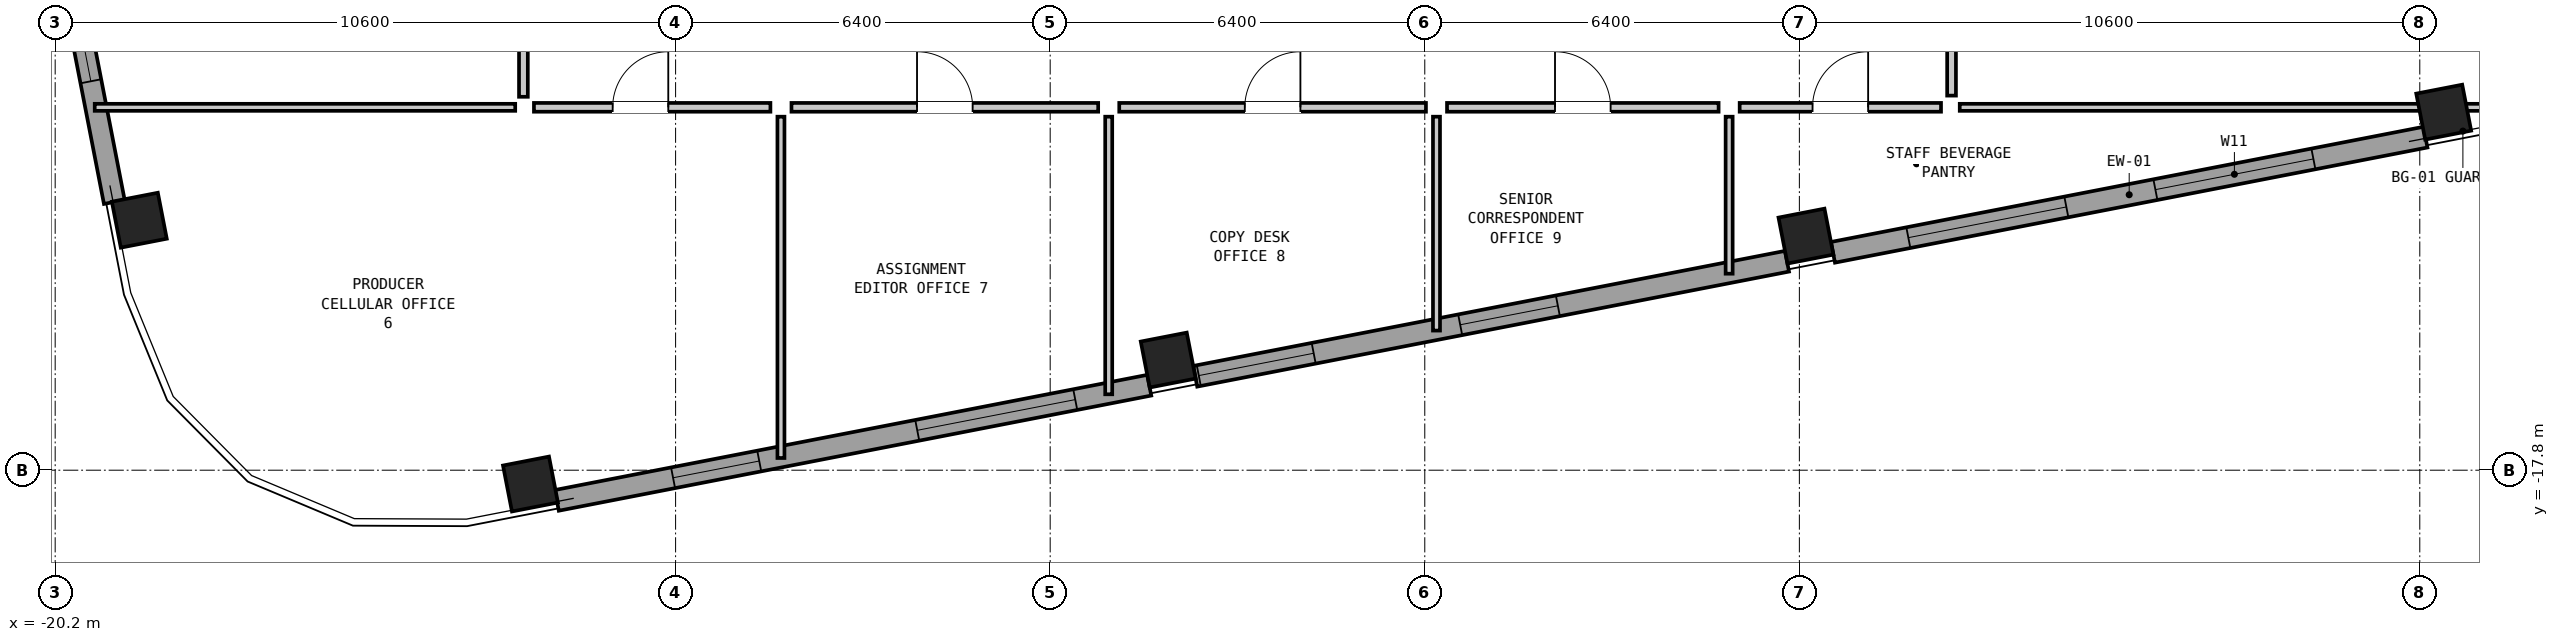
"""IFC4 building model, lengths in metres.
Left out: names, types, materials, properties, quantities, classifications, styles, units other than length and angle.
Written with IfcOpenShell. Run it as: python <this file> out.ifc"""

import sys

from ifc_helpers import new_model, si_unit, direction, frame, frame_2d, origin, origin_2d, place, context, subcontext, project, spatial, rectangle, hollow_rectangle, extrude, element, fill, save


model = new_model("IFC4")
c1 = context("Model", 3, precision=1e-05, world=origin(), true_north=direction((0.0, 1.0)))
c2 = subcontext(c1, "Body", "Model", "MODEL_VIEW")
j1 = project(units=[si_unit("LENGTHUNIT", "METRE"), si_unit("PLANEANGLEUNIT", "RADIAN")], contexts=[c1])
p1 = place(None, origin())
s1 = spatial("IfcSite", under=j1, at=p1, CompositionType="ELEMENT")
p2 = place(p1, origin())
s2 = spatial("IfcBuilding", under=s1, at=p2, CompositionType="ELEMENT")
p3 = place(p2, frame((0.0, 0.0, 121.95)))
s3 = spatial("IfcBuildingStorey", under=s2, at=p3, CompositionType="ELEMENT", Elevation=121.95)
for number, where, z_axis, x_axis in (
    (1, (-12.08, -18.036, 0.0), (0.0, 0.0, 1.0), (0.982, 0.191, 0.0)),
    (2, (-1.183, -15.918, 0.0), (0.0, 0.0, 1.0), (0.982, 0.191, 0.0)),
    (3, (9.713, -13.8, 0.0), (0.0, 0.0, 1.0), (0.982, 0.191, 0.0)),
    (4, (20.609, -11.682, 0.0), (0.0, 0.0, 1.0), (0.982, 0.191, 0.0)),
    (5, (-18.762, -13.529, 0.0), (0.0, 0.0, 1.0), (-0.191, 0.982, 0.0)),
):
    element("IfcColumn", number, at=place(p3, frame(where, z_axis=z_axis, x_axis=x_axis)), inside=s3, PredefinedType="COLUMN", context=c2, shape_type="SweptSolid", body=[
        extrude(hollow_rectangle(XDim=0.8, YDim=0.8, WallThickness=0.05, at=origin_2d()), origin(), (0.0, 0.0, 1.0), 3.05),
    ])
p4 = place(p3, frame((20.296, -12.11, 0.0), z_axis=(0.0, 0.0, 1.0), x_axis=(-0.981628941133, -0.190799952646, 0.0)))
e6 = element("IfcWall", 6, at=p4, inside=s3, PredefinedType="SOLIDWALL", context=c2, shape_type="SweptSolid", body=[
    extrude(rectangle(XDim=10.312, YDim=0.36, at=frame_2d((5.156, 0.0))), origin(), (0.0, 0.0, 1.0), 2.067),
])
p5 = place(p4, frame((1.95, 0.0, 0.2)))
e7 = element("IfcOpeningElement", 7, at=p5, cuts=e6, PredefinedType="OPENING", context=c2, shape_type="SweptSolid", body=[
    extrude(rectangle(XDim=2.75, YDim=0.95, at=frame_2d((1.375, 0.475))), frame((0.0, 0.192, 0.0), z_axis=(0.0, -1.0, 0.0), x_axis=(1.0, 0.0, 0.0)), (0.0, 0.0, 1.0), 0.384),
])
p6 = place(p4, frame((6.25, 0.0, 0.95)))
e8 = element("IfcOpeningElement", 8, at=p6, cuts=e6, PredefinedType="OPENING", context=c2, shape_type="SweptSolid", body=[
    extrude(rectangle(XDim=2.75, YDim=0.95, at=frame_2d((1.375, 0.475))), frame((0.0, 0.192, 0.0), z_axis=(0.0, -1.0, 0.0), x_axis=(1.0, 0.0, 0.0)), (0.0, 0.0, 1.0), 0.384),
])
p7 = place(p3, frame((9.389, -14.23, 0.0), z_axis=(0.0, 0.0, 1.0), x_axis=(-0.981627477005, -0.190807485147, 0.0)))
e9 = element("IfcWall", 9, at=p7, inside=s3, PredefinedType="SOLIDWALL", context=c2, shape_type="SweptSolid", body=[
    extrude(rectangle(XDim=10.3, YDim=0.36, at=frame_2d((5.15, 0.0))), origin(), (0.0, 0.0, 1.0), 2.067),
])
p8 = place(p7, frame((3.988, 0.0, 0.8)))
e10 = element("IfcOpeningElement", 10, at=p8, cuts=e9, PredefinedType="OPENING", context=c2, shape_type="SweptSolid", body=[
    extrude(rectangle(XDim=1.7, YDim=1.1, at=frame_2d((0.85, 0.55))), frame((0.0, 0.192, 0.0), z_axis=(0.0, -1.0, 0.0), x_axis=(1.0, 0.0, 0.0)), (0.0, 0.0, 1.0), 0.384),
])
p9 = place(p7, frame((8.238, 0.0, 0.2)))
e11 = element("IfcOpeningElement", 11, at=p9, cuts=e9, PredefinedType="OPENING", context=c2, shape_type="SweptSolid", body=[
    extrude(rectangle(XDim=2.0, YDim=1.05, at=frame_2d((1.0, 0.525))), frame((0.0, 0.192, 0.0), z_axis=(0.0, -1.0, 0.0), x_axis=(1.0, 0.0, 0.0)), (0.0, 0.0, 1.0), 0.384),
])
p10 = place(p3, frame((-1.507, -16.348, 0.0), z_axis=(0.0, 0.0, 1.0), x_axis=(-0.981628941133, -0.190799952646, 0.0)))
e12 = element("IfcWall", 12, at=p10, inside=s3, PredefinedType="SOLIDWALL", context=c2, shape_type="SweptSolid", body=[
    extrude(rectangle(XDim=10.312, YDim=0.36, at=frame_2d((5.156, 0.0))), origin(), (0.0, 0.0, 1.0), 2.067),
])
p11 = place(p10, frame((1.288, 0.0, 0.95)))
e13 = element("IfcOpeningElement", 13, at=p11, cuts=e12, PredefinedType="OPENING", context=c2, shape_type="SweptSolid", body=[
    extrude(rectangle(XDim=2.75, YDim=0.95, at=frame_2d((1.375, 0.475))), frame((0.0, 0.192, 0.0), z_axis=(0.0, -1.0, 0.0), x_axis=(1.0, 0.0, 0.0)), (0.0, 0.0, 1.0), 0.384),
])
p12 = place(p10, frame((6.788, 0.0, 0.2)))
e14 = element("IfcOpeningElement", 14, at=p12, cuts=e12, PredefinedType="OPENING", context=c2, shape_type="SweptSolid", body=[
    extrude(rectangle(XDim=1.5, YDim=1.0, at=frame_2d((0.75, 0.5))), frame((0.0, 0.192, 0.0), z_axis=(0.0, -1.0, 0.0), x_axis=(1.0, 0.0, 0.0)), (0.0, 0.0, 1.0), 0.384),
])
p13 = place(p3, frame((-19.19, -13.217, 0.0), z_axis=(0.0, 0.0, 1.0), x_axis=(-0.190822765986, 0.981624506612, 0.0)))
e15 = element("IfcWall", 15, at=p13, inside=s3, PredefinedType="SOLIDWALL", context=c2, shape_type="SweptSolid", body=[
    extrude(rectangle(XDim=10.312, YDim=0.36, at=frame_2d((5.156, 0.0))), origin(), (0.0, 0.0, 1.0), 2.067),
])
p14 = place(p13, frame((2.1, 0.0, 0.2)))
e16 = element("IfcOpeningElement", 16, at=p14, cuts=e15, PredefinedType="OPENING", context=c2, shape_type="SweptSolid", body=[
    extrude(rectangle(XDim=2.45, YDim=1.1, at=frame_2d((1.225, 0.55))), frame((0.0, 0.192, 0.0), z_axis=(0.0, -1.0, 0.0), x_axis=(1.0, 0.0, 0.0)), (0.0, 0.0, 1.0), 0.384),
])
p15 = place(p13, frame((6.15, 0.0, 0.95)))
e17 = element("IfcOpeningElement", 17, at=p15, cuts=e15, PredefinedType="OPENING", context=c2, shape_type="SweptSolid", body=[
    extrude(rectangle(XDim=2.95, YDim=0.95, at=frame_2d((1.475, 0.475))), frame((0.0, 0.192, 0.0), z_axis=(0.0, -1.0, 0.0), x_axis=(1.0, 0.0, 0.0)), (0.0, 0.0, 1.0), 0.384),
])
p16 = place(p3, frame((-19.524, -11.6, 0.0), z_axis=(0.0, 0.0, 1.0), x_axis=(1.0, 0.0, 0.0)))
e18 = element("IfcWall", 18, at=p16, inside=s3, PredefinedType="PARTITIONING", context=c2, shape_type="SweptSolid", body=[
    extrude(rectangle(XDim=7.184, YDim=0.12, at=frame_2d((3.592, 0.0))), origin(), (0.0, 0.0, 1.0), 2.347),
])
p17 = place(p3, frame((12.34, -11.6, 0.0), z_axis=(0.0, 0.0, 1.0), x_axis=(1.0, 0.0, 0.0)))
e19 = element("IfcWall", 19, at=p17, inside=s3, PredefinedType="PARTITIONING", context=c2, shape_type="SweptSolid", body=[
    extrude(rectangle(XDim=10.066, YDim=0.12, at=frame_2d((5.033, 0.0))), origin(), (0.0, 0.0, 1.0), 2.127),
])
p18 = place(p3, frame((-7.8, -17.592, 0.0), z_axis=(0.0, 0.0, 1.0), x_axis=(0.0, 1.0, 0.0)))
e20 = element("IfcWall", 20, at=p18, inside=s3, PredefinedType="PARTITIONING", context=c2, shape_type="SweptSolid", body=[
    extrude(rectangle(XDim=5.832, YDim=0.12, at=frame_2d((2.916, 0.0))), origin(), (0.0, 0.0, 1.0), 2.83),
])
p19 = place(p3, frame((-2.2, -16.503, 0.0), z_axis=(0.0, 0.0, 1.0), x_axis=(0.0, 1.0, 0.0)))
e21 = element("IfcWall", 21, at=p19, inside=s3, PredefinedType="PARTITIONING", context=c2, shape_type="SweptSolid", body=[
    extrude(rectangle(XDim=4.743, YDim=0.12, at=frame_2d((2.372, 0.0))), origin(), (0.0, 0.0, 1.0), 2.83),
])
p20 = place(p3, frame((3.4, -15.415, 0.0), z_axis=(0.0, 0.0, 1.0), x_axis=(0.0, 1.0, 0.0)))
e22 = element("IfcWall", 22, at=p20, inside=s3, PredefinedType="PARTITIONING", context=c2, shape_type="SweptSolid", body=[
    extrude(rectangle(XDim=3.655, YDim=0.12, at=frame_2d((1.827, 0.0))), origin(), (0.0, 0.0, 1.0), 2.347),
])
p21 = place(p3, frame((8.4, -14.443, 0.0), z_axis=(0.0, 0.0, 1.0), x_axis=(0.0, 1.0, 0.0)))
e23 = element("IfcWall", 23, at=p21, inside=s3, PredefinedType="PARTITIONING", context=c2, shape_type="SweptSolid", body=[
    extrude(rectangle(XDim=2.683, YDim=0.12, at=frame_2d((1.341, 0.0))), origin(), (0.0, 0.0, 1.0), 2.83),
])
p22 = place(p3, frame((-12.02, -11.6, 0.0), z_axis=(0.0, 0.0, 1.0), x_axis=(1.0, 0.0, 0.0)))
e24 = element("IfcWall", 24, at=p22, inside=s3, PredefinedType="PARTITIONING", context=c2, shape_type="SweptSolid", body=[
    extrude(rectangle(XDim=4.04, YDim=0.15, at=frame_2d((2.02, 0.0))), origin(), (0.0, 0.0, 1.0), 2.347),
])
p23 = place(p22, frame((1.345, 0.0, 0.0)))
e25 = element("IfcOpeningElement", 25, at=p23, cuts=e24, PredefinedType="OPENING", context=c2, shape_type="SweptSolid", body=[
    extrude(rectangle(XDim=0.95, YDim=2.1, at=frame_2d((0.475, 1.05))), frame((0.0, 0.087, 0.0), z_axis=(0.0, -1.0, 0.0), x_axis=(1.0, 0.0, 0.0)), (0.0, 0.0, 1.0), 0.174),
])
p24 = place(p3, frame((-7.62, -11.6, 0.0), z_axis=(0.0, 0.0, 1.0), x_axis=(1.0, 0.0, 0.0)))
e26 = element("IfcWall", 26, at=p24, inside=s3, PredefinedType="PARTITIONING", context=c2, shape_type="SweptSolid", body=[
    extrude(rectangle(XDim=5.24, YDim=0.15, at=frame_2d((2.62, 0.0))), origin(), (0.0, 0.0, 1.0), 2.83),
])
p25 = place(p24, frame((2.145, 0.0, 0.0)))
e27 = element("IfcOpeningElement", 27, at=p25, cuts=e26, PredefinedType="OPENING", context=c2, shape_type="SweptSolid", body=[
    extrude(rectangle(XDim=0.95, YDim=2.1, at=frame_2d((0.475, 1.05))), frame((0.0, 0.087, 0.0), z_axis=(0.0, -1.0, 0.0), x_axis=(1.0, 0.0, 0.0)), (0.0, 0.0, 1.0), 0.174),
])
p26 = place(p3, frame((-2.02, -11.6, 0.0), z_axis=(0.0, 0.0, 1.0), x_axis=(1.0, 0.0, 0.0)))
e28 = element("IfcWall", 28, at=p26, inside=s3, PredefinedType="PARTITIONING", context=c2, shape_type="SweptSolid", body=[
    extrude(rectangle(XDim=5.24, YDim=0.15, at=frame_2d((2.62, 0.0))), origin(), (0.0, 0.0, 1.0), 2.83),
])
p27 = place(p26, frame((2.145, 0.0, 0.0)))
e29 = element("IfcOpeningElement", 29, at=p27, cuts=e28, PredefinedType="OPENING", context=c2, shape_type="SweptSolid", body=[
    extrude(rectangle(XDim=0.95, YDim=2.1, at=frame_2d((0.475, 1.05))), frame((0.0, 0.087, 0.0), z_axis=(0.0, -1.0, 0.0), x_axis=(1.0, 0.0, 0.0)), (0.0, 0.0, 1.0), 0.174),
])
p28 = place(p3, frame((3.58, -11.6, 0.0), z_axis=(0.0, 0.0, 1.0), x_axis=(1.0, 0.0, 0.0)))
e30 = element("IfcWall", 30, at=p28, inside=s3, PredefinedType="PARTITIONING", context=c2, shape_type="SweptSolid", body=[
    extrude(rectangle(XDim=4.64, YDim=0.15, at=frame_2d((2.32, 0.0))), origin(), (0.0, 0.0, 1.0), 2.83),
])
p29 = place(p28, frame((1.845, 0.0, 0.0)))
e31 = element("IfcOpeningElement", 31, at=p29, cuts=e30, PredefinedType="OPENING", context=c2, shape_type="SweptSolid", body=[
    extrude(rectangle(XDim=0.95, YDim=2.1, at=frame_2d((0.475, 1.05))), frame((0.0, 0.087, 0.0), z_axis=(0.0, -1.0, 0.0), x_axis=(1.0, 0.0, 0.0)), (0.0, 0.0, 1.0), 0.174),
])
p30 = place(p3, frame((8.58, -11.6, 0.0), z_axis=(0.0, 0.0, 1.0), x_axis=(1.0, 0.0, 0.0)))
e32 = element("IfcWall", 32, at=p30, inside=s3, PredefinedType="PARTITIONING", context=c2, shape_type="SweptSolid", body=[
    extrude(rectangle(XDim=3.44, YDim=0.15, at=frame_2d((1.72, 0.0))), origin(), (0.0, 0.0, 1.0), 2.347),
])
p31 = place(p30, frame((1.245, 0.0, 0.0)))
e33 = element("IfcOpeningElement", 33, at=p31, cuts=e32, PredefinedType="OPENING", context=c2, shape_type="SweptSolid", body=[
    extrude(rectangle(XDim=0.95, YDim=2.1, at=frame_2d((0.475, 1.05))), frame((0.0, 0.087, 0.0), z_axis=(0.0, -1.0, 0.0), x_axis=(1.0, 0.0, 0.0)), (0.0, 0.0, 1.0), 0.174),
])
p32 = place(p3, frame((-12.2, -11.42, 0.0), z_axis=(0.0, 0.0, 1.0), x_axis=(0.0, 1.0, 0.0)))
e34 = element("IfcWall", 34, at=p32, inside=s3, PredefinedType="PARTITIONING", context=c2, shape_type="SweptSolid", body=[
    extrude(rectangle(XDim=11.24, YDim=0.15, at=frame_2d((5.62, 0.0))), origin(), (0.0, 0.0, 1.0), 2.83),
])
p33 = place(p32, frame((5.145, 0.0, 0.0)))
e35 = element("IfcOpeningElement", 35, at=p33, cuts=e34, PredefinedType="OPENING", context=c2, shape_type="SweptSolid", body=[
    extrude(rectangle(XDim=0.95, YDim=2.1, at=frame_2d((0.475, 1.05))), frame((0.0, 0.087, 0.0), z_axis=(0.0, -1.0, 0.0), x_axis=(1.0, 0.0, 0.0)), (0.0, 0.0, 1.0), 0.174),
])
p34 = place(p3, frame((12.2, -11.4, 0.0), z_axis=(0.0, 0.0, 1.0), x_axis=(0.0, 1.0, 0.0)))
e36 = element("IfcWall", 36, at=p34, inside=s3, PredefinedType="PARTITIONING", context=c2, shape_type="SweptSolid", body=[
    extrude(rectangle(XDim=8.84, YDim=0.15, at=frame_2d((4.42, 0.0))), origin(), (0.0, 0.0, 1.0), 2.83),
])
p35 = place(p34, frame((3.945, 0.0, 0.0)))
e37 = element("IfcOpeningElement", 37, at=p35, cuts=e36, PredefinedType="OPENING", context=c2, shape_type="SweptSolid", body=[
    extrude(rectangle(XDim=0.95, YDim=2.1, at=frame_2d((0.475, 1.05))), frame((0.0, 0.087, 0.0), z_axis=(0.0, -1.0, 0.0), x_axis=(1.0, 0.0, 0.0)), (0.0, 0.0, 1.0), 0.174),
])
p36 = place(p5, origin())
e38 = element("IfcWindow", 38, at=p36, inside=s3, PartitioningType="SINGLE_PANEL", PredefinedType="WINDOW", context=c2, shape_type="SweptSolid", body=[
    extrude(rectangle(XDim=2.75, YDim=0.95, at=frame_2d((1.375, 0.475))), frame((0.0, 0.03, 0.0), z_axis=(0.0, -1.0, 0.0), x_axis=(1.0, 0.0, 0.0)), (0.0, 0.0, 1.0), 0.06),
])
fill(e7, e38)
p37 = place(p6, origin())
e39 = element("IfcWindow", 39, at=p37, inside=s3, PartitioningType="SINGLE_PANEL", PredefinedType="WINDOW", context=c2, shape_type="SweptSolid", body=[
    extrude(rectangle(XDim=2.75, YDim=0.95, at=frame_2d((1.375, 0.475))), frame((0.0, 0.03, 0.0), z_axis=(0.0, -1.0, 0.0), x_axis=(1.0, 0.0, 0.0)), (0.0, 0.0, 1.0), 0.06),
])
fill(e8, e39)
p38 = place(p8, origin())
e40 = element("IfcWindow", 40, at=p38, inside=s3, PartitioningType="SINGLE_PANEL", PredefinedType="WINDOW", context=c2, shape_type="SweptSolid", body=[
    extrude(rectangle(XDim=1.7, YDim=1.1, at=frame_2d((0.85, 0.55))), frame((0.0, 0.03, 0.0), z_axis=(0.0, -1.0, 0.0), x_axis=(1.0, 0.0, 0.0)), (0.0, 0.0, 1.0), 0.06),
])
fill(e10, e40)
p39 = place(p9, origin())
e41 = element("IfcWindow", 41, at=p39, inside=s3, PartitioningType="SINGLE_PANEL", PredefinedType="WINDOW", context=c2, shape_type="SweptSolid", body=[
    extrude(rectangle(XDim=2.0, YDim=1.05, at=frame_2d((1.0, 0.525))), frame((0.0, 0.03, 0.0), z_axis=(0.0, -1.0, 0.0), x_axis=(1.0, 0.0, 0.0)), (0.0, 0.0, 1.0), 0.06),
])
fill(e11, e41)
p40 = place(p11, origin())
e42 = element("IfcWindow", 42, at=p40, inside=s3, PartitioningType="SINGLE_PANEL", PredefinedType="WINDOW", context=c2, shape_type="SweptSolid", body=[
    extrude(rectangle(XDim=2.75, YDim=0.95, at=frame_2d((1.375, 0.475))), frame((0.0, 0.03, 0.0), z_axis=(0.0, -1.0, 0.0), x_axis=(1.0, 0.0, 0.0)), (0.0, 0.0, 1.0), 0.06),
])
fill(e13, e42)
p41 = place(p12, origin())
e43 = element("IfcWindow", 43, at=p41, inside=s3, PartitioningType="SINGLE_PANEL", PredefinedType="WINDOW", context=c2, shape_type="SweptSolid", body=[
    extrude(rectangle(XDim=1.5, YDim=1.0, at=frame_2d((0.75, 0.5))), frame((0.0, 0.03, 0.0), z_axis=(0.0, -1.0, 0.0), x_axis=(1.0, 0.0, 0.0)), (0.0, 0.0, 1.0), 0.06),
])
fill(e14, e43)
p42 = place(p14, origin())
e44 = element("IfcWindow", 44, at=p42, inside=s3, PartitioningType="SINGLE_PANEL", PredefinedType="WINDOW", context=c2, shape_type="SweptSolid", body=[
    extrude(rectangle(XDim=2.45, YDim=1.1, at=frame_2d((1.225, 0.55))), frame((0.0, 0.03, 0.0), z_axis=(0.0, -1.0, 0.0), x_axis=(1.0, 0.0, 0.0)), (0.0, 0.0, 1.0), 0.06),
])
fill(e16, e44)
p43 = place(p23, origin())
e45 = element("IfcDoor", 45, at=p43, inside=s3, OperationType="SINGLE_SWING_RIGHT", PredefinedType="DOOR", context=c2, shape_type="SweptSolid", body=[
    extrude(rectangle(XDim=0.95, YDim=2.1, at=frame_2d((0.475, 1.05))), frame((0.0, 0.025, 0.0), z_axis=(0.0, -1.0, 0.0), x_axis=(1.0, 0.0, 0.0)), (0.0, 0.0, 1.0), 0.05),
])
fill(e25, e45)
p44 = place(p25, origin())
e46 = element("IfcDoor", 46, at=p44, inside=s3, OperationType="SINGLE_SWING_LEFT", PredefinedType="DOOR", context=c2, shape_type="SweptSolid", body=[
    extrude(rectangle(XDim=0.95, YDim=2.1, at=frame_2d((0.475, 1.05))), frame((0.0, 0.025, 0.0), z_axis=(0.0, -1.0, 0.0), x_axis=(1.0, 0.0, 0.0)), (0.0, 0.0, 1.0), 0.05),
])
fill(e27, e46)
p45 = place(p27, origin())
e47 = element("IfcDoor", 47, at=p45, inside=s3, OperationType="SINGLE_SWING_RIGHT", PredefinedType="DOOR", context=c2, shape_type="SweptSolid", body=[
    extrude(rectangle(XDim=0.95, YDim=2.1, at=frame_2d((0.475, 1.05))), frame((0.0, 0.025, 0.0), z_axis=(0.0, -1.0, 0.0), x_axis=(1.0, 0.0, 0.0)), (0.0, 0.0, 1.0), 0.05),
])
fill(e29, e47)
p46 = place(p29, origin())
e48 = element("IfcDoor", 48, at=p46, inside=s3, OperationType="SINGLE_SWING_LEFT", PredefinedType="DOOR", context=c2, shape_type="SweptSolid", body=[
    extrude(rectangle(XDim=0.95, YDim=2.1, at=frame_2d((0.475, 1.05))), frame((0.0, 0.025, 0.0), z_axis=(0.0, -1.0, 0.0), x_axis=(1.0, 0.0, 0.0)), (0.0, 0.0, 1.0), 0.05),
])
fill(e31, e48)
p47 = place(p31, origin())
e49 = element("IfcDoor", 49, at=p47, inside=s3, OperationType="SINGLE_SWING_RIGHT", PredefinedType="DOOR", context=c2, shape_type="SweptSolid", body=[
    extrude(rectangle(XDim=0.95, YDim=2.1, at=frame_2d((0.475, 1.05))), frame((0.0, 0.025, 0.0), z_axis=(0.0, -1.0, 0.0), x_axis=(1.0, 0.0, 0.0)), (0.0, 0.0, 1.0), 0.05),
])
fill(e33, e49)
save(model, sys.argv[1])
